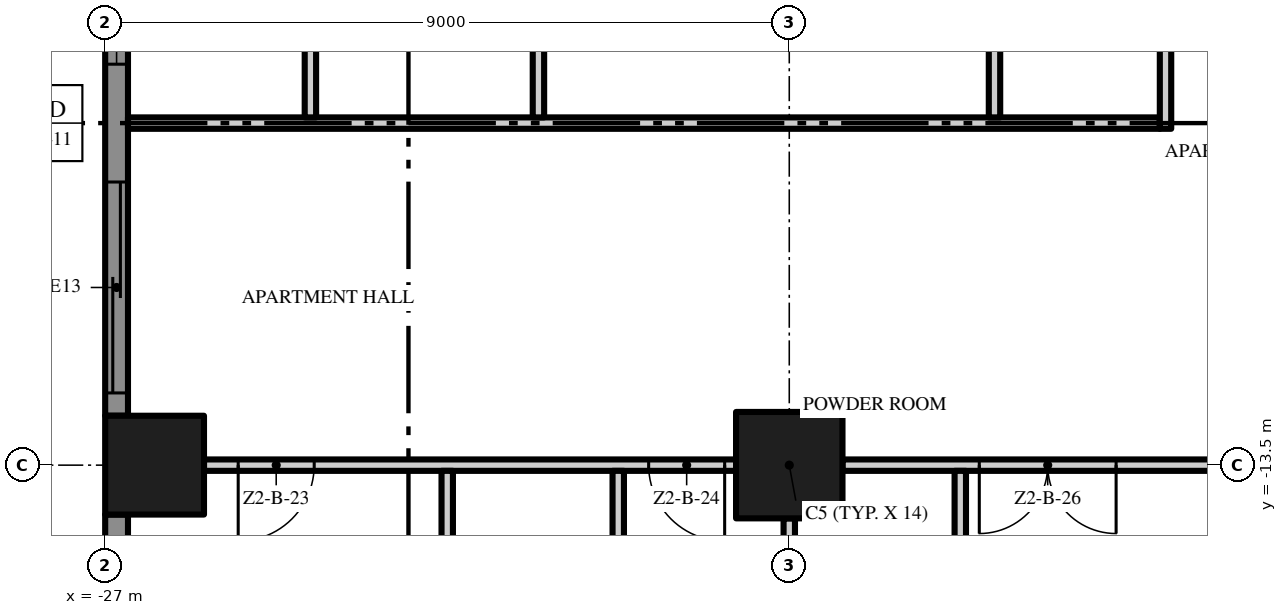
"""IFC4 building model, lengths in metres.
Left out: names, types, materials, properties, quantities, classifications, styles, units other than length and angle.
Written with IfcOpenShell. Run it as: python <this file> out.ifc"""

import sys

from ifc_helpers import new_model, si_unit, direction, frame, frame_2d, origin, origin_2d, place, context, subcontext, project, spatial, polyline, rectangle, outline, extrude, element, fill, save


model = new_model("IFC4")
c1 = context("Model", 3, precision=1e-05, world=origin(), true_north=direction((0.0, 1.0)))
c2 = subcontext(c1, "Body", "Model", "MODEL_VIEW")
j1 = project(units=[si_unit("LENGTHUNIT", "METRE"), si_unit("PLANEANGLEUNIT", "RADIAN")], contexts=[c1])
p1 = place(None, origin())
s1 = spatial("IfcSite", under=j1, at=p1, CompositionType="ELEMENT")
p2 = place(p1, origin())
s2 = spatial("IfcBuilding", under=s1, at=p2, CompositionType="ELEMENT")
p3 = place(p2, frame((0.0, 0.0, 84.6)))
s3 = spatial("IfcBuildingStorey", under=s2, at=p3, CompositionType="ELEMENT", Elevation=84.6)
p4 = place(p3, frame((-18.0, -13.5, 0.0), z_axis=(0.0, 0.0, 1.0), x_axis=(1.0, 0.0, 0.0)))
e1 = element("IfcColumn", 1, at=p4, inside=s3, PredefinedType="COLUMN", context=c2, shape_type="SweptSolid", body=[
    extrude(rectangle(XDim=1.4, YDim=1.4, at=origin_2d()), origin(), (0.0, 0.0, 1.0), 3.5),
])
p5 = place(p3, frame((-26.35, -13.5, 0.0), z_axis=(0.0, 0.0, 1.0), x_axis=(1.0, 0.0, 0.0)))
e2 = element("IfcColumn", 2, at=p5, inside=s3, PredefinedType="COLUMN", context=c2, shape_type="SweptSolid", body=[
    extrude(rectangle(XDim=1.3, YDim=1.3, at=origin_2d()), origin(), (0.0, 0.0, 1.0), 3.5),
])
p6 = place(p3, frame((-26.85, -12.85, 0.0), z_axis=(0.0, 0.0, 1.0), x_axis=(0.0, 1.0, 0.0)))
e3 = element("IfcWall", 3, at=p6, inside=s3, PredefinedType="SOLIDWALL", context=c2, shape_type="SweptSolid", body=[
    extrude(rectangle(XDim=7.7, YDim=0.3, at=frame_2d((3.85, 0.0))), origin(), (0.0, 0.0, 1.0), 3.5),
])
p7 = place(p6, frame((4.625, 0.0, 0.45)))
e4 = element("IfcOpeningElement", 4, at=p7, cuts=e3, PredefinedType="OPENING", context=c2, shape_type="SweptSolid", body=[
    extrude(rectangle(XDim=2.775, YDim=2.65, at=frame_2d((1.387, 1.325))), frame((0.0, 0.16, 0.0), z_axis=(0.0, -1.0, 0.0), x_axis=(1.0, 0.0, 0.0)), (0.0, 0.0, 1.0), 0.32),
])
p8 = place(p6, frame((0.3, 0.0, 0.0)))
e5 = element("IfcOpeningElement", 5, at=p8, cuts=e3, PredefinedType="OPENING", context=c2, shape_type="SweptSolid", body=[
    extrude(rectangle(XDim=2.775, YDim=2.4, at=frame_2d((1.387, 1.2))), frame((0.0, 0.16, 0.0), z_axis=(0.0, -1.0, 0.0), x_axis=(1.0, 0.0, 0.0)), (0.0, 0.0, 1.0), 0.32),
])
p9 = place(p3, frame((-26.85, -18.0, 0.0), z_axis=(0.0, 0.0, 1.0), x_axis=(0.0, 1.0, 0.0)))
e6 = element("IfcWall", 6, at=p9, inside=s3, PredefinedType="SOLIDWALL", context=c2, shape_type="SweptSolid", body=[
    extrude(rectangle(XDim=3.85, YDim=0.3, at=frame_2d((1.925, 0.0))), origin(), (0.0, 0.0, 1.0), 3.5),
])
p10 = place(p9, frame((0.775, 0.0, 0.45)))
e7 = element("IfcOpeningElement", 7, at=p10, cuts=e6, PredefinedType="OPENING", context=c2, shape_type="SweptSolid", body=[
    extrude(rectangle(XDim=2.775, YDim=2.65, at=frame_2d((1.387, 1.325))), frame((0.0, 0.16, 0.0), z_axis=(0.0, -1.0, 0.0), x_axis=(1.0, 0.0, 0.0)), (0.0, 0.0, 1.0), 0.32),
])
p11 = place(p3, origin())
e8 = element("IfcWall", 8, at=p11, inside=s3, PredefinedType="USERDEFINED", context=c2, shape_type="SweptSolid", body=[
    extrude(outline(polyline([(-30.0, 18.0), (-29.771, 16.5), (-29.171, 15.0), (-28.429, 13.5), (-27.829, 12.0), (-27.6, 10.5), (-27.829, 9.0), (-28.429, 7.5), (-29.171, 6.0), (-29.771, 4.5), (-30.0, 3.0), (-29.771, 1.5), (-29.171, 0.0), (-28.429, -1.5), (-27.829, -3.0), (-27.6, -4.5), (-27.829, -6.0), (-28.429, -7.5), (-29.171, -9.0), (-29.771, -10.5), (-30.0, -12.0), (-29.771, -13.5), (-29.171, -15.0), (-28.429, -16.5), (-27.829, -18.0), (-27.597, -17.907), (-28.201, -16.398), (-28.942, -14.898), (-29.528, -13.434), (-29.747, -12.0), (-29.528, -10.566), (-28.942, -9.102), (-28.201, -7.602), (-27.586, -6.066), (-27.347, -4.5), (-27.586, -2.934), (-28.201, -1.398), (-28.942, 0.102), (-29.528, 1.566), (-29.747, 3.0), (-29.528, 4.434), (-28.942, 5.898), (-28.201, 7.398), (-27.586, 8.934), (-27.347, 10.5), (-27.586, 12.066), (-28.201, 13.602), (-28.942, 15.102), (-29.528, 16.566), (-29.753, 18.038), (-30.0, 18.0)])), origin(), (0.0, 0.0, 1.0), 0.9),
])
p12 = place(p3, frame((-18.7, -13.5, 0.0), z_axis=(0.0, 0.0, 1.0), x_axis=(-1.0, 0.0, 0.0)))
e9 = element("IfcWall", 9, at=p12, inside=s3, PredefinedType="PARTITIONING", context=c2, shape_type="SweptSolid", body=[
    extrude(rectangle(XDim=7.0, YDim=0.15, at=frame_2d((3.5, 0.0))), origin(), (0.0, 0.0, 1.0), 3.5),
])
p13 = place(p12, frame((5.55, 0.0, 0.0)))
e10 = element("IfcOpeningElement", 10, at=p13, cuts=e9, PredefinedType="OPENING", context=c2, shape_type="SweptSolid", body=[
    extrude(rectangle(XDim=1.0, YDim=2.4, at=frame_2d((0.5, 1.2))), frame((0.0, 0.085, 0.0), z_axis=(0.0, -1.0, 0.0), x_axis=(1.0, 0.0, 0.0)), (0.0, 0.0, 1.0), 0.17),
])
p14 = place(p12, frame((0.15, 0.0, 0.0)))
e11 = element("IfcOpeningElement", 11, at=p14, cuts=e9, PredefinedType="OPENING", context=c2, shape_type="SweptSolid", body=[
    extrude(rectangle(XDim=1.0, YDim=2.4, at=frame_2d((0.5, 1.2))), frame((0.0, 0.085, 0.0), z_axis=(0.0, -1.0, 0.0), x_axis=(1.0, 0.0, 0.0)), (0.0, 0.0, 1.0), 0.17),
])
p15 = place(p3, frame((-9.7, -13.5, 0.0), z_axis=(0.0, 0.0, 1.0), x_axis=(-1.0, 0.0, 0.0)))
e12 = element("IfcWall", 12, at=p15, inside=s3, PredefinedType="PARTITIONING", context=c2, shape_type="SweptSolid", body=[
    extrude(rectangle(XDim=7.6, YDim=0.15, at=frame_2d((3.8, 0.0))), origin(), (0.0, 0.0, 1.0), 3.5),
])
p16 = place(p15, frame((4.0, 0.0, 0.0)))
e13 = element("IfcOpeningElement", 13, at=p16, cuts=e12, PredefinedType="OPENING", context=c2, shape_type="SweptSolid", body=[
    extrude(rectangle(XDim=1.8, YDim=2.4, at=frame_2d((0.9, 1.2))), frame((0.0, 0.085, 0.0), z_axis=(0.0, -1.0, 0.0), x_axis=(1.0, 0.0, 0.0)), (0.0, 0.0, 1.0), 0.17),
])
p17 = place(p3, frame((-26.7, -9.0, 0.0), z_axis=(0.0, 0.0, 1.0), x_axis=(1.0, 0.0, 0.0)))
e14 = element("IfcWall", 14, at=p17, inside=s3, PredefinedType="PARTITIONING", context=c2, shape_type="SweptSolid", body=[
    extrude(rectangle(XDim=13.575, YDim=0.15, at=frame_2d((6.787, 0.0))), origin(), (0.0, 0.0, 1.0), 3.5),
])
p18 = place(p3, frame((-24.3, -8.925, 0.0), z_axis=(0.0, 0.0, 1.0), x_axis=(0.0, 1.0, 0.0)))
e15 = element("IfcWall", 15, at=p18, inside=s3, PredefinedType="PARTITIONING", context=c2, shape_type="SweptSolid", body=[
    extrude(rectangle(XDim=4.35, YDim=0.15, at=frame_2d((2.175, 0.0))), origin(), (0.0, 0.0, 1.0), 3.5),
])
p19 = place(p3, frame((-22.5, -17.35, 0.0), z_axis=(0.0, 0.0, 1.0), x_axis=(0.0, 1.0, 0.0)))
e16 = element("IfcWall", 16, at=p19, inside=s3, PredefinedType="PARTITIONING", context=c2, shape_type="SweptSolid", body=[
    extrude(rectangle(XDim=3.775, YDim=0.15, at=frame_2d((1.887, 0.0))), origin(), (0.0, 0.0, 1.0), 3.5),
])
p20 = place(p3, frame((-21.3, -8.925, 0.0), z_axis=(0.0, 0.0, 1.0), x_axis=(0.0, 1.0, 0.0)))
e17 = element("IfcWall", 17, at=p20, inside=s3, PredefinedType="PARTITIONING", context=c2, shape_type="SweptSolid", body=[
    extrude(rectangle(XDim=4.35, YDim=0.15, at=frame_2d((2.175, 0.0))), origin(), (0.0, 0.0, 1.0), 3.5),
])
p21 = place(p3, frame((-20.25, -16.575, 0.0), z_axis=(0.0, 0.0, 1.0), x_axis=(0.0, 1.0, 0.0)))
e18 = element("IfcWall", 18, at=p21, inside=s3, PredefinedType="PARTITIONING", context=c2, shape_type="SweptSolid", body=[
    extrude(rectangle(XDim=3.0, YDim=0.15, at=frame_2d((1.5, 0.0))), origin(), (0.0, 0.0, 1.0), 3.5),
])
p22 = place(p3, frame((-18.0, -21.2, 0.0), z_axis=(0.0, 0.0, 1.0), x_axis=(0.0, 1.0, 0.0)))
e19 = element("IfcWall", 19, at=p22, inside=s3, PredefinedType="PARTITIONING", context=c2, shape_type="SweptSolid", body=[
    extrude(rectangle(XDim=7.0, YDim=0.15, at=frame_2d((3.5, 0.0))), origin(), (0.0, 0.0, 1.0), 3.5),
])
p23 = place(p3, frame((-15.75, -16.575, 0.0), z_axis=(0.0, 0.0, 1.0), x_axis=(0.0, 1.0, 0.0)))
e20 = element("IfcWall", 20, at=p23, inside=s3, PredefinedType="PARTITIONING", context=c2, shape_type="SweptSolid", body=[
    extrude(rectangle(XDim=3.0, YDim=0.15, at=frame_2d((1.5, 0.0))), origin(), (0.0, 0.0, 1.0), 3.5),
])
p24 = place(p3, frame((-15.3, -8.925, 0.0), z_axis=(0.0, 0.0, 1.0), x_axis=(0.0, 1.0, 0.0)))
e21 = element("IfcWall", 21, at=p24, inside=s3, PredefinedType="PARTITIONING", context=c2, shape_type="SweptSolid", body=[
    extrude(rectangle(XDim=4.35, YDim=0.15, at=frame_2d((2.175, 0.0))), origin(), (0.0, 0.0, 1.0), 3.5),
])
p25 = place(p3, frame((-13.05, -9.075, 0.0), z_axis=(0.0, 0.0, 1.0), x_axis=(0.0, 1.0, 0.0)))
e22 = element("IfcWall", 22, at=p25, inside=s3, PredefinedType="PARTITIONING", context=c2, shape_type="SweptSolid", body=[
    extrude(rectangle(XDim=4.65, YDim=0.15, at=frame_2d((2.325, 0.0))), origin(), (0.0, 0.0, 1.0), 3.5),
])
p26 = place(p25, frame((1.875, 0.0, 0.0)))
e23 = element("IfcOpeningElement", 23, at=p26, cuts=e22, PredefinedType="OPENING", context=c2, shape_type="SweptSolid", body=[
    extrude(rectangle(XDim=0.9, YDim=2.1, at=frame_2d((0.45, 1.05))), frame((0.0, 0.085, 0.0), z_axis=(0.0, -1.0, 0.0), x_axis=(1.0, 0.0, 0.0)), (0.0, 0.0, 1.0), 0.17),
])
p27 = place(p7, origin())
e24 = element("IfcWindow", 24, at=p27, inside=s3, PartitioningType="SINGLE_PANEL", PredefinedType="WINDOW", context=c2, shape_type="SweptSolid", body=[
    extrude(rectangle(XDim=2.775, YDim=2.65, at=frame_2d((1.387, 1.325))), frame((0.0, 0.03, 0.0), z_axis=(0.0, -1.0, 0.0), x_axis=(1.0, 0.0, 0.0)), (0.0, 0.0, 1.0), 0.06),
])
fill(e4, e24)
p28 = place(p8, origin())
e25 = element("IfcDoor", 25, at=p28, inside=s3, OperationType="SINGLE_SWING_LEFT", PredefinedType="DOOR", context=c2, shape_type="SweptSolid", body=[
    extrude(rectangle(XDim=2.775, YDim=2.4, at=frame_2d((1.387, 1.2))), frame((0.0, 0.025, 0.0), z_axis=(0.0, -1.0, 0.0), x_axis=(1.0, 0.0, 0.0)), (0.0, 0.0, 1.0), 0.05),
])
fill(e5, e25)
p29 = place(p13, origin())
e26 = element("IfcDoor", 26, at=p29, inside=s3, OperationType="SINGLE_SWING_RIGHT", PredefinedType="DOOR", context=c2, shape_type="SweptSolid", body=[
    extrude(rectangle(XDim=1.0, YDim=2.4, at=frame_2d((0.5, 1.2))), frame((0.0, 0.025, 0.0), z_axis=(0.0, -1.0, 0.0), x_axis=(1.0, 0.0, 0.0)), (0.0, 0.0, 1.0), 0.05),
])
fill(e10, e26)
p30 = place(p14, origin())
e27 = element("IfcDoor", 27, at=p30, inside=s3, OperationType="SINGLE_SWING_LEFT", PredefinedType="DOOR", context=c2, shape_type="SweptSolid", body=[
    extrude(rectangle(XDim=1.0, YDim=2.4, at=frame_2d((0.5, 1.2))), frame((0.0, 0.025, 0.0), z_axis=(0.0, -1.0, 0.0), x_axis=(1.0, 0.0, 0.0)), (0.0, 0.0, 1.0), 0.05),
])
fill(e11, e27)
p31 = place(p16, origin())
e28 = element("IfcDoor", 28, at=p31, inside=s3, OperationType="DOUBLE_DOOR_SINGLE_SWING", PredefinedType="DOOR", context=c2, shape_type="SweptSolid", body=[
    extrude(rectangle(XDim=1.8, YDim=2.4, at=frame_2d((0.9, 1.2))), frame((0.0, 0.025, 0.0), z_axis=(0.0, -1.0, 0.0), x_axis=(1.0, 0.0, 0.0)), (0.0, 0.0, 1.0), 0.05),
])
fill(e13, e28)
save(model, sys.argv[1])
